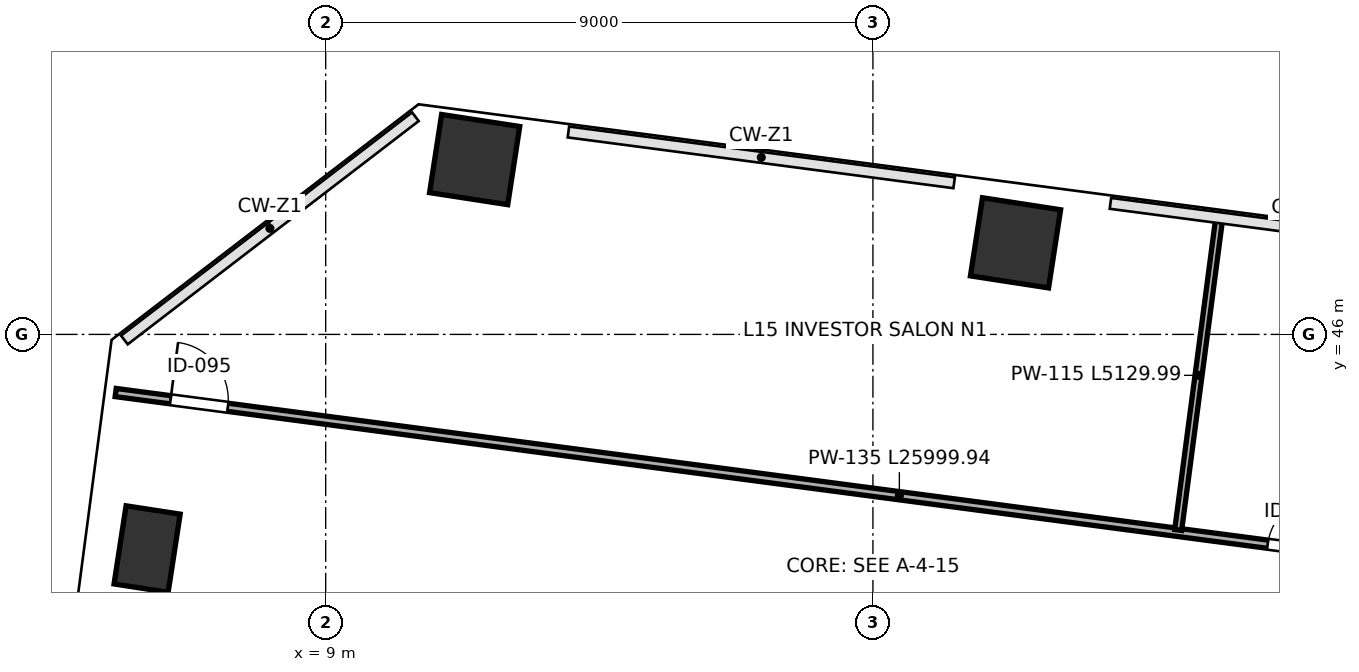
"""IFC4 building model, lengths in metres.
Left out: names, types, materials, properties, quantities, classifications, styles, units other than length and angle.
Written with IfcOpenShell. Run it as: python <this file> out.ifc"""

import sys

from ifc_helpers import new_model, si_unit, direction, frame, frame_2d, origin, origin_2d, place, context, subcontext, project, spatial, rectangle, extrude, clip, halfspace, source, transform, mapped, element, fill, save


model = new_model("IFC4")
c1 = context("Model", 3, precision=1e-05, world=origin(), true_north=direction((0.0, 1.0)))
c2 = subcontext(c1, "Body", "Model", "MODEL_VIEW")
j1 = project(units=[si_unit("LENGTHUNIT", "METRE"), si_unit("PLANEANGLEUNIT", "RADIAN")], contexts=[c1])
p1 = place(None, origin())
s1 = spatial("IfcSite", under=j1, at=p1, CompositionType="ELEMENT")
p2 = place(p1, origin())
s2 = spatial("IfcBuilding", under=s1, at=p2, CompositionType="ELEMENT")
p3 = place(p2, frame((0.0, 0.0, 70.6)))
s3 = spatial("IfcBuildingStorey", under=s2, at=p3, CompositionType="ELEMENT", Elevation=70.6)
p4 = place(p3, frame((11.45, 48.875, 0.0), z_axis=(0.087784728528, 0.0509475269, 0.994835760787), x_axis=(0.365223858313, -0.930791670435, 0.015440193265)))
e1 = element("IfcColumn", 1, at=p4, inside=s3, PredefinedType="COLUMN", context=c2, shape_type="Clipping", body=[
    clip(clip(extrude(rectangle(XDim=1.3, YDim=1.3, at=origin_2d()), origin(), (0.0, 0.0, 1.0), 4.222), halfspace(frame((0.0, 0.0, 0.076), z_axis=(0.0, 0.0, -1.0), x_axis=(1.0, 0.0, 0.0)), False)), halfspace(frame((0.0, 0.0, 4.145), z_axis=(0.0, 0.0, 1.0), x_axis=(1.0, 0.0, 0.0)), False)),
])
p5 = place(p3, frame((20.345, 47.506, 0.0), z_axis=(0.080306079935, 0.005098798726, 0.996757210045), x_axis=(-0.088698367744, -0.995983311457, 0.012241031745)))
e2 = element("IfcColumn", 2, at=p5, inside=s3, PredefinedType="COLUMN", context=c2, shape_type="Clipping", body=[
    clip(clip(extrude(rectangle(XDim=1.3, YDim=1.3, at=origin_2d()), origin(), (0.0, 0.0, 1.0), 4.214), halfspace(frame((0.0, 0.0, 0.061), z_axis=(0.0, 0.0, -1.0), x_axis=(1.0, 0.0, 0.0)), False)), halfspace(frame((0.0, 0.0, 4.153), z_axis=(0.0, 0.0, 1.0), x_axis=(1.0, 0.0, 0.0)), False)),
])
p6 = place(p3, frame((6.063, 42.47, 0.0), z_axis=(0.055023356479, 0.079208175625, 0.995338382238), x_axis=(0.725340794557, -0.688233594609, 0.014671434947)))
e3 = element("IfcColumn", 3, at=p6, inside=s3, PredefinedType="PILASTER", context=c2, shape_type="Clipping", body=[
    clip(clip(extrude(rectangle(XDim=0.9, YDim=1.3, at=origin_2d()), origin(), (0.0, 0.0, 1.0), 4.22), halfspace(frame((0.0, 0.0, 0.07), z_axis=(0.0, 0.0, -1.0), x_axis=(1.0, 0.0, 0.0)), False)), halfspace(frame((0.0, 0.0, 4.15), z_axis=(0.0, 0.0, 1.0), x_axis=(1.0, 0.0, 0.0)), False)),
])
p7 = place(p3, frame((5.546, 45.044, 0.0), z_axis=(0.0, 0.0, 1.0), x_axis=(0.99144534416, -0.13052252504, 0.0)))
e4 = element("IfcWall", 4, at=p7, inside=s3, PredefinedType="PARTITIONING", context=c2, shape_type="SweptSolid", body=[
    extrude(rectangle(XDim=26.0, YDim=0.135, at=frame_2d((13.0, 0.0))), origin(), (0.0, 0.0, 1.0), 3.96),
])
p8 = place(p7, frame((0.91, 0.0, 0.0)))
e5 = element("IfcOpeningElement", 5, at=p8, cuts=e4, PredefinedType="OPENING", context=c2, shape_type="SweptSolid", body=[
    extrude(rectangle(XDim=0.95, YDim=2.15, at=frame_2d((0.475, 1.075))), frame((0.0, 0.078, 0.0), z_axis=(0.0, -1.0, 0.0), x_axis=(1.0, 0.0, 0.0)), (0.0, 0.0, 1.0), 0.155),
])
p9 = place(p7, frame((19.11, 0.0, 0.0)))
e6 = element("IfcOpeningElement", 6, at=p9, cuts=e4, PredefinedType="OPENING", context=c2, shape_type="SweptSolid", body=[
    extrude(rectangle(XDim=0.95, YDim=2.15, at=frame_2d((0.475, 1.075))), frame((0.0, 0.078, 0.0), z_axis=(0.0, -1.0, 0.0), x_axis=(1.0, 0.0, 0.0)), (0.0, 0.0, 1.0), 0.155),
])
p10 = place(p3, frame((23.021, 42.784, 0.0), z_axis=(0.0, 0.0, 1.0), x_axis=(0.130539454953, 0.991443115212, 0.0)))
e7 = element("IfcWall", 7, at=p10, inside=s3, PredefinedType="PARTITIONING", context=c2, shape_type="SweptSolid", body=[
    extrude(rectangle(XDim=5.13, YDim=0.115, at=frame_2d((2.565, 0.0))), origin(), (0.0, 0.0, 1.0), 3.095),
])
m1 = source(origin(), c2, "Body", "SweptSolid", [
    extrude(rectangle(XDim=0.95, YDim=2.15, at=frame_2d((0.475, 1.075))), frame((0.0, 0.025, 0.0), z_axis=(0.0, -1.0, 0.0), x_axis=(1.0, 0.0, 0.0)), (0.0, 0.0, 1.0), 0.05),
])
p11 = place(p8, origin())
e8 = element("IfcDoor", 8, at=p11, inside=s3, OperationType="SINGLE_SWING_LEFT", PredefinedType="DOOR", context=c2, shape_type="MappedRepresentation", body=[
    mapped(m1, transform((0.0, 0.0, 0.0), scale=1.0)),
])
fill(e5, e8)
p12 = place(p9, origin())
e9 = element("IfcDoor", 9, at=p12, inside=s3, OperationType="SINGLE_SWING_RIGHT", PredefinedType="DOOR", context=c2, shape_type="MappedRepresentation", body=[
    mapped(m1, transform((0.0, 0.0, 0.0), scale=1.0)),
])
fill(e6, e9)
save(model, sys.argv[1])
